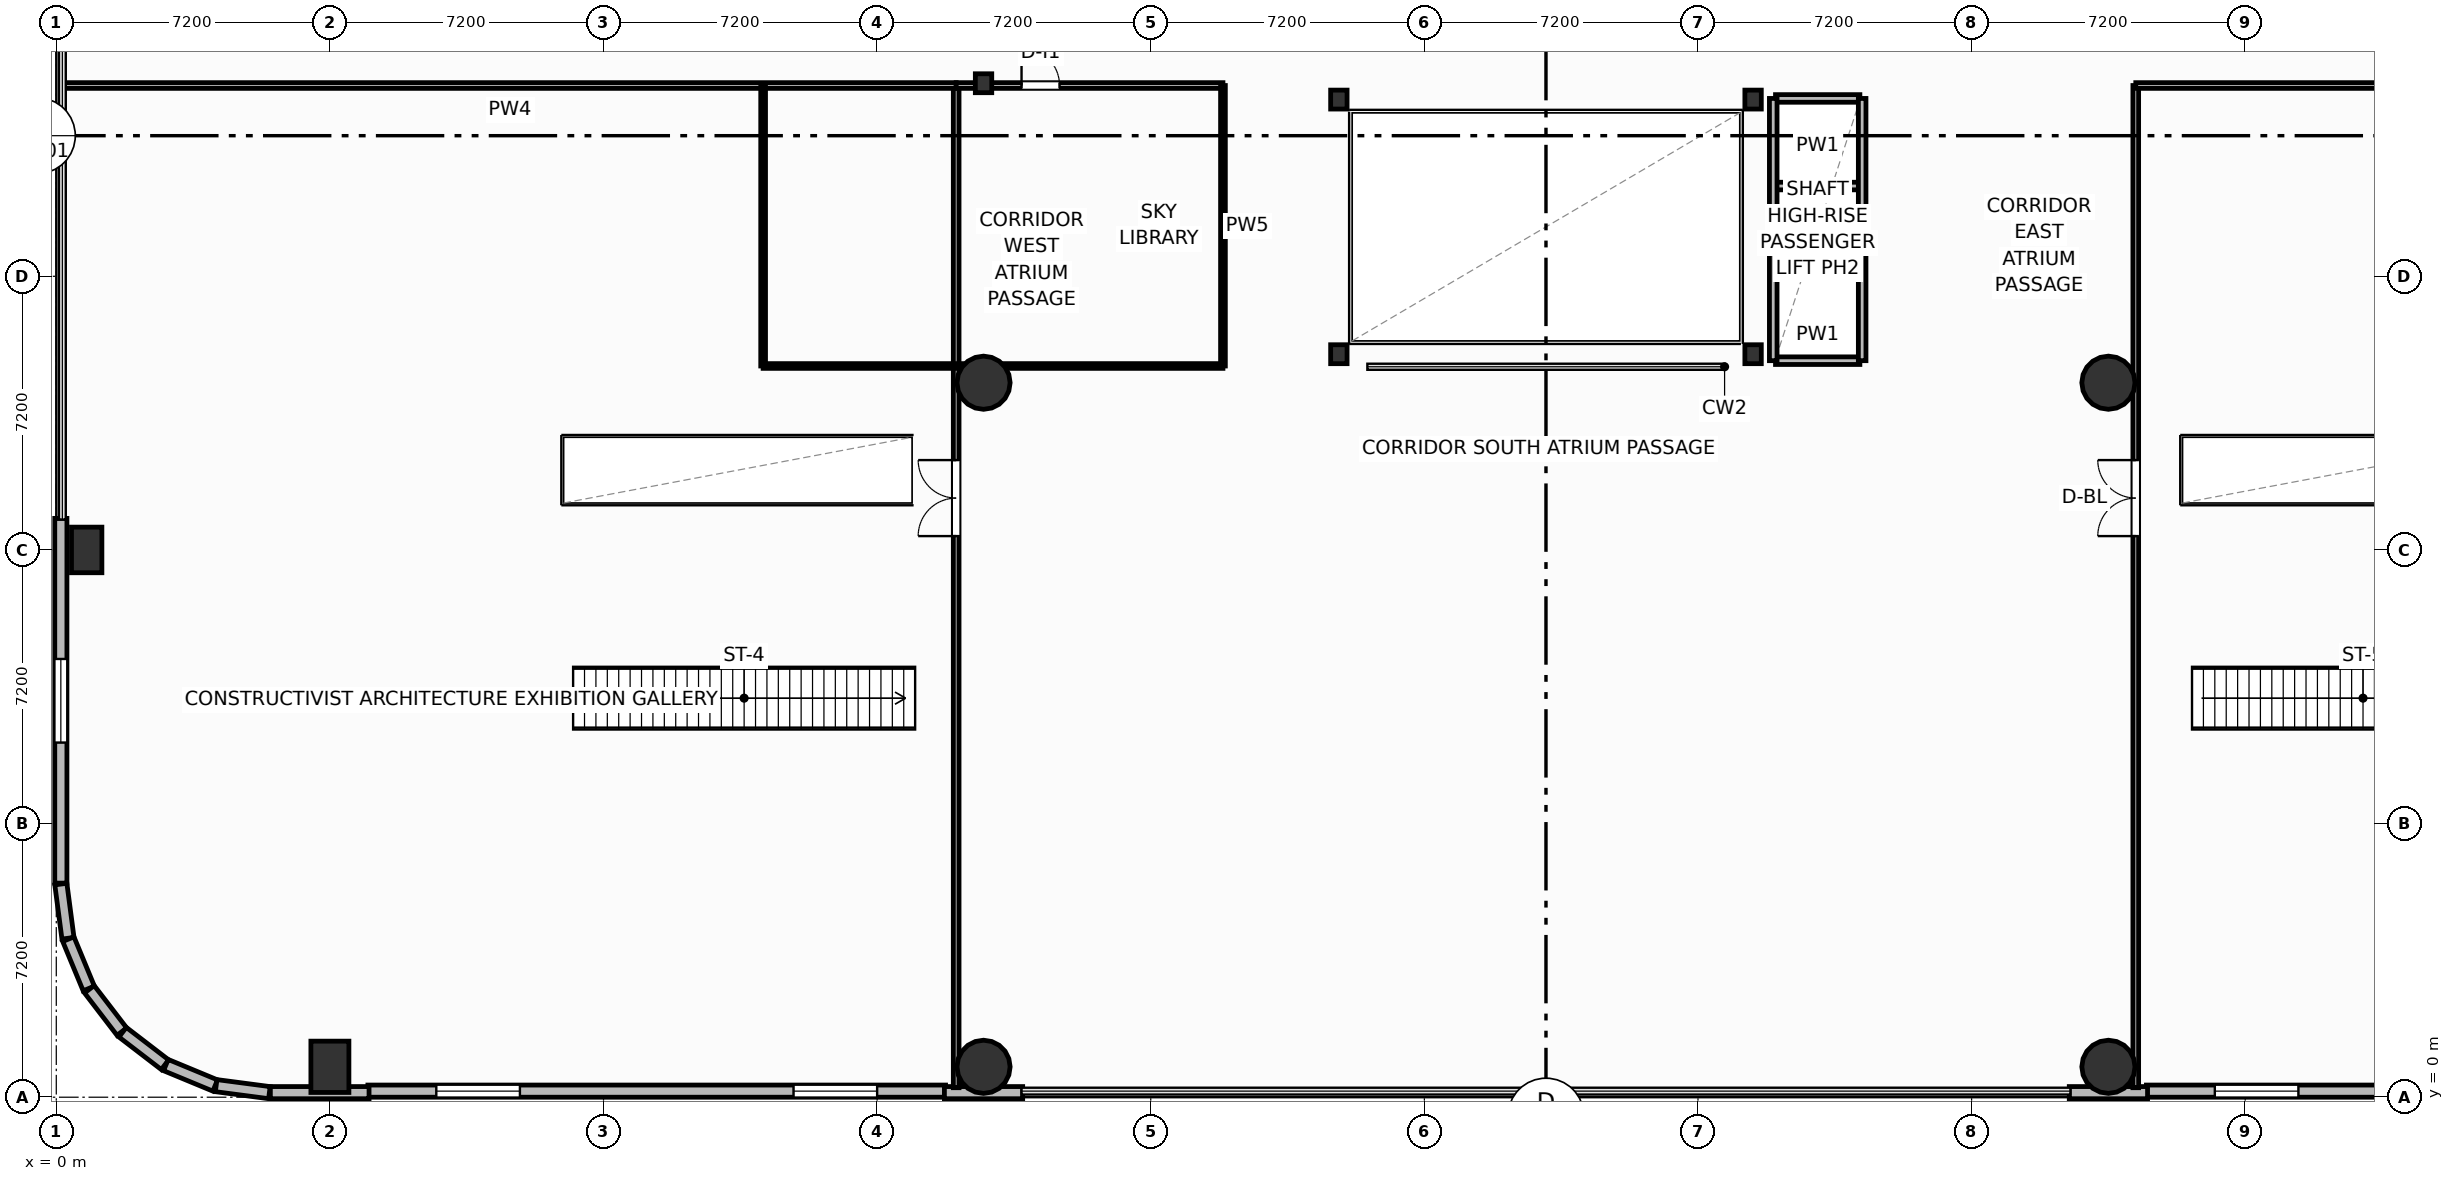
"""IFC4 building model, lengths in metres.
Left out: names, types, materials, properties, quantities, classifications, styles, units other than length and angle.
Written with IfcOpenShell. Run it as: python <this file> out.ifc"""

import sys

from ifc_helpers import new_model, si_unit, direction, frame, frame_2d, origin, origin_2d, place, context, subcontext, project, spatial, rectangle, circle, i_section, extrude, element, fill, save


model = new_model("IFC4")
c1 = context("Model", 3, precision=1e-05, world=origin(), true_north=direction((0.0, 1.0)))
c2 = subcontext(c1, "Body", "Model", "MODEL_VIEW")
j1 = project(units=[si_unit("LENGTHUNIT", "METRE"), si_unit("PLANEANGLEUNIT", "RADIAN")], contexts=[c1])
p1 = place(None, origin())
s1 = spatial("IfcSite", under=j1, at=p1, CompositionType="ELEMENT")
p2 = place(p1, origin())
s2 = spatial("IfcBuilding", under=s1, at=p2, CompositionType="ELEMENT")
p3 = place(p2, frame((0.0, 0.0, 10.8)))
s3 = spatial("IfcBuildingStorey", under=s2, at=p3, CompositionType="ELEMENT", Elevation=10.8)
for number, where, z_axis, x_axis in (
    (1, (33.75, 19.55, 0.0), (0.0, 0.0, 1.0), (1.0, 0.0, 0.0)),
    (2, (44.65, 19.55, 0.0), (0.0, 0.0, 1.0), (1.0, 0.0, 0.0)),
    (3, (33.75, 26.25, 0.0), (0.0, 0.0, 1.0), (1.0, 0.0, 0.0)),
    (4, (44.65, 26.25, 0.0), (0.0, 0.0, 1.0), (1.0, 0.0, 0.0)),
    (5, (24.4, 26.68, 0.0), (0.0, 0.0, 1.0), (1.0, 0.0, 0.0)),
):
    element("IfcColumn", number, at=place(p3, frame(where, z_axis=z_axis, x_axis=x_axis)), inside=s3, PredefinedType="COLUMN", context=c2, shape_type="SweptSolid", body=[
        extrude(i_section(OverallWidth=0.432, OverallDepth=0.498, WebThickness=0.056, FlangeThickness=0.089, FilletRadius=0.025, at=origin_2d()), origin(), (0.0, 0.0, 1.0), 5.4),
    ])
p4 = place(p3, frame((7.2, 0.8, 0.0), z_axis=(0.0, 0.0, 1.0), x_axis=(1.0, 0.0, 0.0)))
e6 = element("IfcColumn", 6, at=p4, inside=s3, PredefinedType="COLUMN", context=c2, shape_type="SweptSolid", body=[
    extrude(rectangle(XDim=1.0, YDim=1.35, at=origin_2d()), origin(), (0.0, 0.0, 1.0), 5.4),
])
for number, where, z_axis, x_axis in (
    (7, (24.4, 0.8, 0.0), (0.0, 0.0, 1.0), (1.0, 0.0, 0.0)),
    (8, (54.0, 0.8, 0.0), (0.0, 0.0, 1.0), (1.0, 0.0, 0.0)),
    (9, (24.4, 18.8, 0.0), (0.0, 0.0, 1.0), (1.0, 0.0, 0.0)),
    (10, (54.0, 18.8, 0.0), (0.0, 0.0, 1.0), (1.0, 0.0, 0.0)),
):
    element("IfcColumn", number, at=place(p3, frame(where, z_axis=z_axis, x_axis=x_axis)), inside=s3, PredefinedType="COLUMN", context=c2, shape_type="SweptSolid", body=[
        extrude(circle(Radius=0.7, at=origin_2d()), origin(), (0.0, 0.0, 1.0), 5.4),
    ])
p5 = place(p3, frame((0.8, 14.4, 0.0), z_axis=(0.0, 0.0, 1.0), x_axis=(1.0, 0.0, 0.0)))
e11 = element("IfcColumn", 11, at=p5, inside=s3, PredefinedType="PILASTER", context=c2, shape_type="SweptSolid", body=[
    extrude(rectangle(XDim=0.8, YDim=1.2, at=origin_2d()), origin(), (0.0, 0.0, 1.0), 5.4),
])
p6 = place(p3, frame((23.4, 0.16, 0.0), z_axis=(0.0, 0.0, 1.0), x_axis=(-1.0, 0.0, 0.0)))
e12 = element("IfcWall", 12, at=p6, inside=s3, PredefinedType="SOLIDWALL", context=c2, shape_type="SweptSolid", body=[
    extrude(rectangle(XDim=15.2, YDim=0.32, at=frame_2d((7.6, 0.0))), origin(), (0.0, 0.0, 1.0), 4.07),
])
p7 = place(p6, frame((1.8, 0.0, 0.8)))
e13 = element("IfcOpeningElement", 13, at=p7, cuts=e12, PredefinedType="OPENING", context=c2, shape_type="SweptSolid", body=[
    extrude(rectangle(XDim=2.2, YDim=1.85, at=frame_2d((1.1, 0.925))), frame((0.0, 0.17, 0.0), z_axis=(0.0, -1.0, 0.0), x_axis=(1.0, 0.0, 0.0)), (0.0, 0.0, 1.0), 0.34),
])
p8 = place(p6, frame((11.2, 0.0, 0.8)))
e14 = element("IfcOpeningElement", 14, at=p8, cuts=e12, PredefinedType="OPENING", context=c2, shape_type="SweptSolid", body=[
    extrude(rectangle(XDim=2.2, YDim=1.85, at=frame_2d((1.1, 0.925))), frame((0.0, 0.17, 0.0), z_axis=(0.0, -1.0, 0.0), x_axis=(1.0, 0.0, 0.0)), (0.0, 0.0, 1.0), 0.34),
])
p9 = place(p3, frame((70.2, 0.16, 0.0), z_axis=(0.0, 0.0, 1.0), x_axis=(-1.0, 0.0, 0.0)))
e15 = element("IfcWall", 15, at=p9, inside=s3, PredefinedType="SOLIDWALL", context=c2, shape_type="SweptSolid", body=[
    extrude(rectangle(XDim=15.2, YDim=0.32, at=frame_2d((7.6, 0.0))), origin(), (0.0, 0.0, 1.0), 4.07),
])
p10 = place(p9, frame((1.8, 0.0, 0.8)))
e16 = element("IfcOpeningElement", 16, at=p10, cuts=e15, PredefinedType="OPENING", context=c2, shape_type="SweptSolid", body=[
    extrude(rectangle(XDim=2.2, YDim=1.85, at=frame_2d((1.1, 0.925))), frame((0.0, 0.17, 0.0), z_axis=(0.0, -1.0, 0.0), x_axis=(1.0, 0.0, 0.0)), (0.0, 0.0, 1.0), 0.34),
])
p11 = place(p9, frame((11.2, 0.0, 0.8)))
e17 = element("IfcOpeningElement", 17, at=p11, cuts=e15, PredefinedType="OPENING", context=c2, shape_type="SweptSolid", body=[
    extrude(rectangle(XDim=2.2, YDim=1.85, at=frame_2d((1.1, 0.925))), frame((0.0, 0.17, 0.0), z_axis=(0.0, -1.0, 0.0), x_axis=(1.0, 0.0, 0.0)), (0.0, 0.0, 1.0), 0.34),
])
p12 = place(p3, frame((0.12, 5.608, 0.0), z_axis=(0.0, 0.0, 1.0), x_axis=(0.130362303307, -0.991466423978, 0.0)))
e18 = element("IfcWall", 18, at=p12, inside=s3, PredefinedType="SOLIDWALL", context=c2, shape_type="SweptSolid", body=[
    extrude(rectangle(XDim=1.438, YDim=0.32, at=frame_2d((0.719, 0.0))), origin(), (0.0, 0.0, 1.0), 4.07),
])
p13 = place(p3, frame((0.317, 4.159, 0.0), z_axis=(0.0, 0.0, 1.0), x_axis=(0.382628033724, -0.923902477434, 0.0)))
e19 = element("IfcWall", 19, at=p13, inside=s3, PredefinedType="SOLIDWALL", context=c2, shape_type="SweptSolid", body=[
    extrude(rectangle(XDim=1.405, YDim=0.32, at=frame_2d((0.703, 0.0))), origin(), (0.0, 0.0, 1.0), 4.07),
])
p14 = place(p3, frame((0.87, 2.841, 0.0), z_axis=(0.0, 0.0, 1.0), x_axis=(0.60871962085, -0.79338541907, 0.0)))
e20 = element("IfcWall", 20, at=p14, inside=s3, PredefinedType="SOLIDWALL", context=c2, shape_type="SweptSolid", body=[
    extrude(rectangle(XDim=1.405, YDim=0.32, at=frame_2d((0.703, 0.0))), origin(), (0.0, 0.0, 1.0), 4.07),
])
for number, where, z_axis, x_axis in (
    (21, (1.746, 1.711, 0.0), (0.0, 0.0, 1.0), (0.793, -0.609, 0.0)),
    (22, (2.884, 0.846, 0.0), (0.0, 0.0, 1.0), (0.924, -0.383, 0.0)),
):
    element("IfcWall", number, at=place(p3, frame(where, z_axis=z_axis, x_axis=x_axis)), inside=s3, PredefinedType="SOLIDWALL", context=c2, shape_type="SweptSolid", body=[
        extrude(rectangle(XDim=1.406, YDim=0.32, at=frame_2d((0.703, 0.0))), origin(), (0.0, 0.0, 1.0), 4.07),
    ])
p15 = place(p3, frame((4.207, 0.304, 0.0), z_axis=(0.0, 0.0, 1.0), x_axis=(0.991457235349, -0.130432168094, 0.0)))
e23 = element("IfcWall", 23, at=p15, inside=s3, PredefinedType="SOLIDWALL", context=c2, shape_type="SweptSolid", body=[
    extrude(rectangle(XDim=1.413, YDim=0.32, at=frame_2d((0.707, 0.0))), origin(), (0.0, 0.0, 1.0), 4.07),
])
p16 = place(p3, frame((5.633, 0.12, 0.0), z_axis=(0.0, 0.0, 1.0), x_axis=(1.0, 0.0, 0.0)))
e24 = element("IfcWall", 24, at=p16, inside=s3, PredefinedType="SOLIDWALL", context=c2, shape_type="SweptSolid", body=[
    extrude(rectangle(XDim=2.597, YDim=0.32, at=frame_2d((1.299, 0.0))), origin(), (0.0, 0.0, 1.0), 4.07),
])
p17 = place(p3, frame((23.37, 0.12, 0.0), z_axis=(0.0, 0.0, 1.0), x_axis=(1.0, 0.0, 0.0)))
e25 = element("IfcWall", 25, at=p17, inside=s3, PredefinedType="SOLIDWALL", context=c2, shape_type="SweptSolid", body=[
    extrude(rectangle(XDim=2.06, YDim=0.32, at=frame_2d((1.03, 0.0))), origin(), (0.0, 0.0, 1.0), 4.07),
])
p18 = place(p3, frame((52.97, 0.12, 0.0), z_axis=(0.0, 0.0, 1.0), x_axis=(1.0, 0.0, 0.0)))
e26 = element("IfcWall", 26, at=p18, inside=s3, PredefinedType="SOLIDWALL", context=c2, shape_type="SweptSolid", body=[
    extrude(rectangle(XDim=2.06, YDim=0.32, at=frame_2d((1.03, 0.0))), origin(), (0.0, 0.0, 1.0), 4.07),
])
p19 = place(p3, frame((0.12, 15.23, 0.0), z_axis=(0.0, 0.0, 1.0), x_axis=(0.0, -1.0, 0.0)))
e27 = element("IfcWall", 27, at=p19, inside=s3, PredefinedType="SOLIDWALL", context=c2, shape_type="SweptSolid", body=[
    extrude(rectangle(XDim=9.597, YDim=0.32, at=frame_2d((4.799, 0.0))), origin(), (0.0, 0.0, 1.0), 4.07),
])
p20 = place(p19, frame((3.698, 0.0, 0.8)))
e28 = element("IfcOpeningElement", 28, at=p20, cuts=e27, PredefinedType="OPENING", context=c2, shape_type="SweptSolid", body=[
    extrude(rectangle(XDim=2.2, YDim=2.0, at=frame_2d((1.1, 1.0))), frame((0.0, 0.17, 0.0), z_axis=(0.0, -1.0, 0.0), x_axis=(1.0, 0.0, 0.0)), (0.0, 0.0, 1.0), 0.34),
])
p21 = place(p3, frame((23.68, 0.25, 0.0), z_axis=(0.0, 0.0, 1.0), x_axis=(0.0, 1.0, 0.0)))
e29 = element("IfcWall", 29, at=p21, inside=s3, PredefinedType="PARTITIONING", context=c2, shape_type="SweptSolid", body=[
    extrude(rectangle(XDim=26.37, YDim=0.15, at=frame_2d((13.185, 0.0))), origin(), (0.0, 0.0, 1.0), 5.12),
])
p22 = place(p21, frame((14.514, 0.0, 0.0)))
e30 = element("IfcOpeningElement", 30, at=p22, cuts=e29, PredefinedType="OPENING", context=c2, shape_type="SweptSolid", body=[
    extrude(rectangle(XDim=2.0, YDim=2.05, at=frame_2d((1.0, 1.025))), frame((0.0, 0.085, 0.0), z_axis=(0.0, -1.0, 0.0), x_axis=(1.0, 0.0, 0.0)), (0.0, 0.0, 1.0), 0.17),
])
p23 = place(p3, frame((54.72, 0.25, 0.0), z_axis=(0.0, 0.0, 1.0), x_axis=(0.0, 1.0, 0.0)))
e31 = element("IfcWall", 31, at=p23, inside=s3, PredefinedType="PARTITIONING", context=c2, shape_type="SweptSolid", body=[
    extrude(rectangle(XDim=26.37, YDim=0.15, at=frame_2d((13.185, 0.0))), origin(), (0.0, 0.0, 1.0), 5.12),
])
p24 = place(p23, frame((14.514, 0.0, 0.0)))
e32 = element("IfcOpeningElement", 32, at=p24, cuts=e31, PredefinedType="OPENING", context=c2, shape_type="SweptSolid", body=[
    extrude(rectangle(XDim=2.0, YDim=2.05, at=frame_2d((1.0, 1.025))), frame((0.0, 0.085, 0.0), z_axis=(0.0, -1.0, 0.0), x_axis=(1.0, 0.0, 0.0)), (0.0, 0.0, 1.0), 0.17),
])
for number, where, z_axis, x_axis in (
    (33, (0.2, 26.62, 0.0), (0.0, 0.0, 1.0), (1.0, 0.0, 0.0)),
    (34, (54.72, 26.62, 0.0), (0.0, 0.0, 1.0), (1.0, 0.0, 0.0)),
):
    element("IfcWall", number, at=place(p3, frame(where, z_axis=z_axis, x_axis=x_axis)), inside=s3, PredefinedType="PARTITIONING", context=c2, shape_type="SweptSolid", body=[
        extrude(rectangle(XDim=23.48, YDim=0.15, at=frame_2d((11.74, 0.0))), origin(), (0.0, 0.0, 1.0), 5.12),
    ])
p25 = place(p3, frame((23.68, 26.62, 0.0), z_axis=(0.0, 0.0, 1.0), x_axis=(1.0, 0.0, 0.0)))
e35 = element("IfcWall", 35, at=p25, inside=s3, PredefinedType="PARTITIONING", context=c2, shape_type="SweptSolid", body=[
    extrude(rectangle(XDim=7.02, YDim=0.15, at=frame_2d((3.51, 0.0))), origin(), (0.0, 0.0, 1.0), 4.332),
])
p26 = place(p25, frame((1.72, 0.0, 0.0)))
e36 = element("IfcOpeningElement", 36, at=p26, cuts=e35, PredefinedType="OPENING", context=c2, shape_type="SweptSolid", body=[
    extrude(rectangle(XDim=1.0, YDim=2.05, at=frame_2d((0.5, 1.025))), frame((0.0, 0.085, 0.0), z_axis=(0.0, -1.0, 0.0), x_axis=(1.0, 0.0, 0.0)), (0.0, 0.0, 1.0), 0.17),
])
p27 = place(p3, frame((30.7, 19.24, 0.0), z_axis=(0.0, 0.0, 1.0), x_axis=(0.0, 1.0, 0.0)))
e37 = element("IfcWall", 37, at=p27, inside=s3, PredefinedType="PARTITIONING", context=c2, shape_type="SweptSolid", body=[
    extrude(rectangle(XDim=7.38, YDim=0.125, at=frame_2d((3.69, 0.0))), origin(), (0.0, 0.0, 1.0), 5.12),
])
p28 = place(p3, frame((18.6, 19.24, 0.0), z_axis=(0.0, 0.0, 1.0), x_axis=(0.0, 1.0, 0.0)))
e38 = element("IfcWall", 38, at=p28, inside=s3, PredefinedType="PARTITIONING", context=c2, shape_type="SweptSolid", body=[
    extrude(rectangle(XDim=7.34, YDim=0.125, at=frame_2d((3.67, 0.0))), origin(), (0.0, 0.0, 1.0), 5.12),
])
p29 = place(p3, frame((18.6, 19.24, 0.0), z_axis=(0.0, 0.0, 1.0), x_axis=(1.0, 0.0, 0.0)))
e39 = element("IfcWall", 39, at=p29, inside=s3, PredefinedType="PARTITIONING", context=c2, shape_type="SweptSolid", body=[
    extrude(rectangle(XDim=12.1, YDim=0.125, at=frame_2d((6.05, 0.0))), origin(), (0.0, 0.0, 1.0), 5.12),
])
for number, where, z_axis, x_axis in (
    (40, (45.24, 21.675, 0.0), (0.0, 0.0, 1.0), (1.0, 0.0, 0.0)),
    (41, (45.24, 23.975, 0.0), (0.0, 0.0, 1.0), (1.0, 0.0, 0.0)),
    (42, (45.24, 19.38, 0.0), (0.0, 0.0, 1.0), (1.0, 0.0, 0.0)),
    (43, (45.24, 26.28, 0.0), (0.0, 0.0, 1.0), (1.0, 0.0, 0.0)),
):
    element("IfcWall", number, at=place(p3, frame(where, z_axis=z_axis, x_axis=x_axis)), inside=s3, PredefinedType="PARTITIONING", context=c2, shape_type="SweptSolid", body=[
        extrude(rectangle(XDim=2.22, YDim=0.2, at=frame_2d((1.11, 0.0))), origin(), (0.0, 0.0, 1.0), 5.12),
    ])
for number, where, z_axis, x_axis in (
    (44, (45.18, 19.38, 0.0), (0.0, 0.0, 1.0), (0.0, 1.0, 0.0)),
    (45, (47.52, 19.38, 0.0), (0.0, 0.0, 1.0), (0.0, 1.0, 0.0)),
):
    element("IfcWall", number, at=place(p3, frame(where, z_axis=z_axis, x_axis=x_axis)), inside=s3, PredefinedType="PARTITIONING", context=c2, shape_type="SweptSolid", body=[
        extrude(rectangle(XDim=6.9, YDim=0.2, at=frame_2d((3.45, 0.0))), origin(), (0.0, 0.0, 1.0), 5.12),
    ])
p30 = place(p7, origin())
e46 = element("IfcWindow", 46, at=p30, inside=s3, PartitioningType="SINGLE_PANEL", PredefinedType="WINDOW", context=c2, shape_type="SweptSolid", body=[
    extrude(rectangle(XDim=2.2, YDim=1.85, at=frame_2d((1.1, 0.925))), frame((0.0, 0.03, 0.0), z_axis=(0.0, -1.0, 0.0), x_axis=(1.0, 0.0, 0.0)), (0.0, 0.0, 1.0), 0.06),
])
fill(e13, e46)
p31 = place(p8, origin())
e47 = element("IfcWindow", 47, at=p31, inside=s3, PartitioningType="SINGLE_PANEL", PredefinedType="WINDOW", context=c2, shape_type="SweptSolid", body=[
    extrude(rectangle(XDim=2.2, YDim=1.85, at=frame_2d((1.1, 0.925))), frame((0.0, 0.03, 0.0), z_axis=(0.0, -1.0, 0.0), x_axis=(1.0, 0.0, 0.0)), (0.0, 0.0, 1.0), 0.06),
])
fill(e14, e47)
p32 = place(p11, origin())
e48 = element("IfcWindow", 48, at=p32, inside=s3, PartitioningType="SINGLE_PANEL", PredefinedType="WINDOW", context=c2, shape_type="SweptSolid", body=[
    extrude(rectangle(XDim=2.2, YDim=1.85, at=frame_2d((1.1, 0.925))), frame((0.0, 0.03, 0.0), z_axis=(0.0, -1.0, 0.0), x_axis=(1.0, 0.0, 0.0)), (0.0, 0.0, 1.0), 0.06),
])
fill(e17, e48)
p33 = place(p20, origin())
e49 = element("IfcWindow", 49, at=p33, inside=s3, PartitioningType="SINGLE_PANEL", PredefinedType="WINDOW", context=c2, shape_type="SweptSolid", body=[
    extrude(rectangle(XDim=2.2, YDim=2.0, at=frame_2d((1.1, 1.0))), frame((0.0, 0.03, 0.0), z_axis=(0.0, -1.0, 0.0), x_axis=(1.0, 0.0, 0.0)), (0.0, 0.0, 1.0), 0.06),
])
fill(e28, e49)
p34 = place(p22, origin())
e50 = element("IfcDoor", 50, at=p34, inside=s3, OperationType="DOUBLE_DOOR_SINGLE_SWING", PredefinedType="DOOR", context=c2, shape_type="SweptSolid", body=[
    extrude(rectangle(XDim=2.0, YDim=2.05, at=frame_2d((1.0, 1.025))), frame((0.0, 0.025, 0.0), z_axis=(0.0, -1.0, 0.0), x_axis=(1.0, 0.0, 0.0)), (0.0, 0.0, 1.0), 0.05),
])
fill(e30, e50)
p35 = place(p24, origin())
e51 = element("IfcDoor", 51, at=p35, inside=s3, OperationType="DOUBLE_DOOR_SINGLE_SWING", PredefinedType="DOOR", context=c2, shape_type="SweptSolid", body=[
    extrude(rectangle(XDim=2.0, YDim=2.05, at=frame_2d((1.0, 1.025))), frame((0.0, 0.025, 0.0), z_axis=(0.0, -1.0, 0.0), x_axis=(1.0, 0.0, 0.0)), (0.0, 0.0, 1.0), 0.05),
])
fill(e32, e51)
p36 = place(p26, origin())
e52 = element("IfcDoor", 52, at=p36, inside=s3, OperationType="SINGLE_SWING_LEFT", PredefinedType="DOOR", context=c2, shape_type="SweptSolid", body=[
    extrude(rectangle(XDim=1.0, YDim=2.05, at=frame_2d((0.5, 1.025))), frame((0.0, 0.025, 0.0), z_axis=(0.0, -1.0, 0.0), x_axis=(1.0, 0.0, 0.0)), (0.0, 0.0, 1.0), 0.05),
])
fill(e36, e52)
save(model, sys.argv[1])
